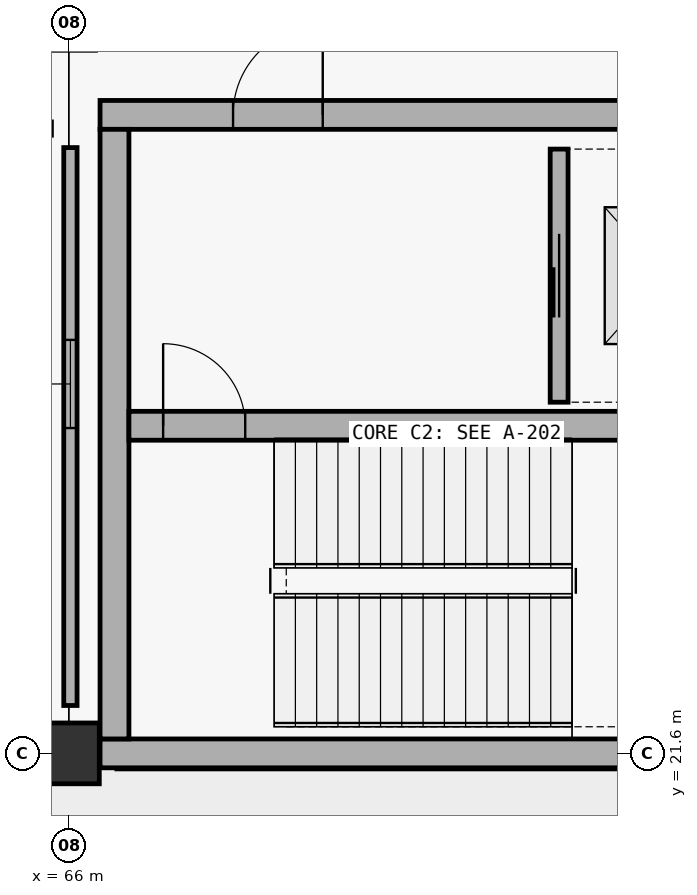
"""IFC4 building model, lengths in metres.
Left out: names, types, materials, properties, quantities, classifications, styles, units other than length and angle.
Written with IfcOpenShell. Run it as: python <this file> out.ifc"""

import sys

from ifc_helpers import new_model, si_unit, direction, frame, frame_2d, origin, origin_2d, place, context, subcontext, project, spatial, rectangle, extrude, element, fill, save


model = new_model("IFC4")
c1 = context("Model", 3, precision=1e-05, world=origin(), true_north=direction((0.0, 1.0)))
c2 = subcontext(c1, "Body", "Model", "MODEL_VIEW")
j1 = project(units=[si_unit("LENGTHUNIT", "METRE"), si_unit("PLANEANGLEUNIT", "RADIAN")], contexts=[c1])
p1 = place(None, origin())
s1 = spatial("IfcSite", under=j1, at=p1, CompositionType="ELEMENT")
p2 = place(p1, origin())
s2 = spatial("IfcBuilding", under=s1, at=p2, CompositionType="ELEMENT")
p3 = place(p2, frame((0.0, 0.0, 15.6)))
s3 = spatial("IfcBuildingStorey", under=s2, at=p3, CompositionType="ELEMENT", Elevation=15.6)
p4 = place(p3, frame((66.0, 21.6, 0.0), z_axis=(0.0, 0.0, 1.0), x_axis=(1.0, 0.0, 0.0)))
e1 = element("IfcColumn", 1, at=p4, inside=s3, PredefinedType="COLUMN", context=c2, shape_type="SweptSolid", body=[
    extrude(rectangle(XDim=0.8, YDim=0.8, at=origin_2d()), origin(), (0.0, 0.0, 1.0), 5.1),
])
p5 = place(p3, frame((66.41, 21.6, 0.0), z_axis=(0.0, 0.0, 1.0), x_axis=(1.0, 0.0, 0.0)))
e2 = element("IfcWall", 2, at=p5, inside=s3, PredefinedType="SHEAR", context=c2, shape_type="SweptSolid", body=[
    extrude(rectangle(XDim=9.38, YDim=0.38, at=frame_2d((4.69, 0.0))), origin(), (0.0, 0.0, 1.0), 5.1),
])
p6 = place(p3, frame((66.41, 30.0, 0.0), z_axis=(0.0, 0.0, 1.0), x_axis=(1.0, 0.0, 0.0)))
e3 = element("IfcWall", 3, at=p6, inside=s3, PredefinedType="SHEAR", context=c2, shape_type="SweptSolid", body=[
    extrude(rectangle(XDim=9.38, YDim=0.38, at=frame_2d((4.69, 0.0))), origin(), (0.0, 0.0, 1.0), 5.1),
])
p7 = place(p6, frame((1.75, 0.0, 0.0)))
e4 = element("IfcOpeningElement", 4, at=p7, cuts=e3, PredefinedType="OPENING", context=c2, shape_type="SweptSolid", body=[
    extrude(rectangle(XDim=1.18, YDim=2.24, at=frame_2d((0.59, 1.12))), frame((0.0, 0.2, 0.0), z_axis=(0.0, -1.0, 0.0), x_axis=(1.0, 0.0, 0.0)), (0.0, 0.0, 1.0), 0.4),
])
p8 = place(p3, frame((66.6, 21.79, 0.0), z_axis=(0.0, 0.0, 1.0), x_axis=(0.0, 1.0, 0.0)))
e5 = element("IfcWall", 5, at=p8, inside=s3, PredefinedType="SHEAR", context=c2, shape_type="SweptSolid", body=[
    extrude(rectangle(XDim=8.02, YDim=0.38, at=frame_2d((4.01, 0.0))), origin(), (0.0, 0.0, 1.0), 5.1),
])
p9 = place(p3, frame((66.79, 25.91, 0.0), z_axis=(0.0, 0.0, 1.0), x_axis=(1.0, 0.0, 0.0)))
e6 = element("IfcWall", 6, at=p9, inside=s3, PredefinedType="SHEAR", context=c2, shape_type="SweptSolid", body=[
    extrude(rectangle(XDim=8.62, YDim=0.38, at=frame_2d((4.31, 0.0))), origin(), (0.0, 0.0, 1.0), 5.1),
])
p10 = place(p9, frame((0.45, 0.0, 0.0)))
e7 = element("IfcOpeningElement", 7, at=p10, cuts=e6, PredefinedType="OPENING", context=c2, shape_type="SweptSolid", body=[
    extrude(rectangle(XDim=1.08, YDim=2.18, at=frame_2d((0.54, 1.09))), frame((0.0, 0.2, 0.0), z_axis=(0.0, -1.0, 0.0), x_axis=(1.0, 0.0, 0.0)), (0.0, 0.0, 1.0), 0.4),
])
p11 = place(p3, frame((72.45, 26.22, 0.0), z_axis=(0.0, 0.0, 1.0), x_axis=(0.0, 1.0, 0.0)))
e8 = element("IfcWall", 8, at=p11, inside=s3, PredefinedType="PARTITIONING", context=c2, shape_type="SweptSolid", body=[
    extrude(rectangle(XDim=3.33, YDim=0.235, at=frame_2d((1.665, 0.0))), origin(), (0.0, 0.0, 1.0), 4.72),
])
p12 = place(p11, frame((1.115, 0.0, 0.0)))
e9 = element("IfcOpeningElement", 9, at=p12, cuts=e8, PredefinedType="OPENING", context=c2, shape_type="SweptSolid", body=[
    extrude(rectangle(XDim=1.1, YDim=2.2, at=frame_2d((0.55, 1.1))), frame((0.0, 0.127, 0.0), z_axis=(0.0, -1.0, 0.0), x_axis=(1.0, 0.0, 0.0)), (0.0, 0.0, 1.0), 0.255),
])
p13 = place(p3, frame((66.02, 22.23, 0.0), z_axis=(0.0, 0.0, 1.0), x_axis=(0.0, 1.0, 0.0)))
e10 = element("IfcWall", 10, at=p13, inside=s3, PredefinedType="PARTITIONING", context=c2, shape_type="SweptSolid", body=[
    extrude(rectangle(XDim=7.34, YDim=0.175, at=frame_2d((3.67, 0.0))), origin(), (0.0, 0.0, 1.0), 3.91),
])
p14 = place(p13, frame((3.65, 0.0, 0.9)))
e11 = element("IfcOpeningElement", 11, at=p14, cuts=e10, PredefinedType="OPENING", context=c2, shape_type="SweptSolid", body=[
    extrude(rectangle(XDim=1.16, YDim=1.62, at=frame_2d((0.58, 0.81))), frame((0.0, 0.097, 0.0), z_axis=(0.0, -1.0, 0.0), x_axis=(1.0, 0.0, 0.0)), (0.0, 0.0, 1.0), 0.195),
])
p15 = place(p10, origin())
e12 = element("IfcDoor", 12, at=p15, inside=s3, OperationType="SINGLE_SWING_LEFT", PredefinedType="DOOR", context=c2, shape_type="SweptSolid", body=[
    extrude(rectangle(XDim=1.08, YDim=2.18, at=frame_2d((0.54, 1.09))), frame((0.0, 0.025, 0.0), z_axis=(0.0, -1.0, 0.0), x_axis=(1.0, 0.0, 0.0)), (0.0, 0.0, 1.0), 0.05),
])
fill(e7, e12)
p16 = place(p7, origin())
e13 = element("IfcDoor", 13, at=p16, inside=s3, OperationType="SINGLE_SWING_RIGHT", PredefinedType="DOOR", context=c2, shape_type="SweptSolid", body=[
    extrude(rectangle(XDim=1.18, YDim=2.24, at=frame_2d((0.59, 1.12))), frame((0.0, 0.025, 0.0), z_axis=(0.0, -1.0, 0.0), x_axis=(1.0, 0.0, 0.0)), (0.0, 0.0, 1.0), 0.05),
])
fill(e4, e13)
p17 = place(p12, origin())
e14 = element("IfcDoor", 14, at=p17, inside=s3, OperationType="SLIDING_TO_LEFT", PredefinedType="DOOR", context=c2, shape_type="SweptSolid", body=[
    extrude(rectangle(XDim=1.1, YDim=2.2, at=frame_2d((0.55, 1.1))), frame((0.0, 0.025, 0.0), z_axis=(0.0, -1.0, 0.0), x_axis=(1.0, 0.0, 0.0)), (0.0, 0.0, 1.0), 0.05),
])
fill(e9, e14)
p18 = place(p14, origin())
e15 = element("IfcWindow", 15, at=p18, inside=s3, PartitioningType="SINGLE_PANEL", PredefinedType="WINDOW", context=c2, shape_type="SweptSolid", body=[
    extrude(rectangle(XDim=1.16, YDim=1.62, at=frame_2d((0.58, 0.81))), frame((0.0, 0.03, 0.0), z_axis=(0.0, -1.0, 0.0), x_axis=(1.0, 0.0, 0.0)), (0.0, 0.0, 1.0), 0.06),
])
fill(e11, e15)
save(model, sys.argv[1])
